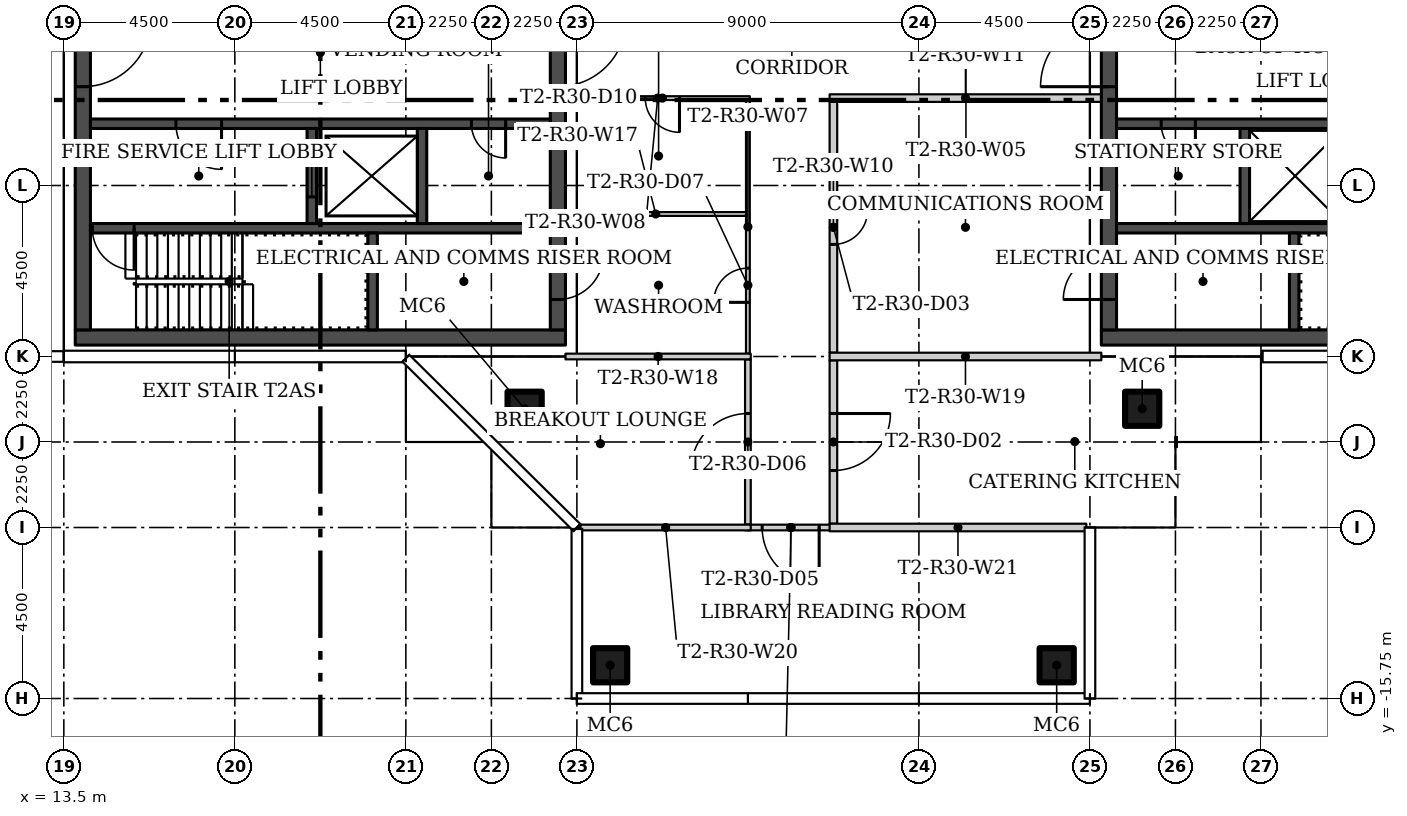
"""IFC4 building model, lengths in metres.
Left out: names, types, materials, properties, quantities, classifications, styles, units other than length and angle.
Written with IfcOpenShell. Run it as: python <this file> out.ifc"""

import sys

from ifc_helpers import new_model, si_unit, direction, frame, frame_2d, origin, origin_2d, place, context, subcontext, project, spatial, rectangle, hollow_rectangle, extrude, element, fill, save


model = new_model("IFC4")
c1 = context("Model", 3, precision=1e-05, world=origin(), true_north=direction((0.0, 1.0)))
c2 = subcontext(c1, "Body", "Model", "MODEL_VIEW")
j1 = project(units=[si_unit("LENGTHUNIT", "METRE"), si_unit("PLANEANGLEUNIT", "RADIAN")], contexts=[c1])
p1 = place(None, origin())
s1 = spatial("IfcSite", under=j1, at=p1, CompositionType="ELEMENT")
p2 = place(p1, origin())
s2 = spatial("IfcBuilding", under=s1, at=p2, CompositionType="ELEMENT")
p3 = place(p2, frame((0.0, 0.0, 269.4)))
s3 = spatial("IfcBuildingStorey", under=s2, at=p3, CompositionType="ELEMENT", Elevation=269.4)
for number, where in (
    (1, (25.625, -8.125, 0.0)),
    (2, (41.875, -8.125, 0.0)),
    (3, (39.625, -14.875, 0.0)),
    (4, (27.875, -14.875, 0.0)),
):
    element("IfcColumn", number, at=place(p3, frame(where)), inside=s3, PredefinedType="COLUMN", context=c2, shape_type="SweptSolid", body=[
        extrude(hollow_rectangle(XDim=0.9, YDim=0.9, WallThickness=0.036, at=origin_2d()), origin(), (0.0, 0.0, 1.0), 3.45),
    ])
p4 = place(p3, frame((31.5, -11.175, 0.0), z_axis=(0.0, 0.0, 1.0), x_axis=(0.0, 1.0, 0.0)))
e5 = element("IfcWall", 5, at=p4, inside=s3, PredefinedType="PARTITIONING", context=c2, shape_type="SweptSolid", body=[
    extrude(rectangle(XDim=4.35, YDim=0.15, at=frame_2d((2.175, 0.0))), origin(), (0.0, 0.0, 1.0), 3.45),
])
p5 = place(p4, frame((1.425, 0.0, 0.0)))
e6 = element("IfcOpeningElement", 6, at=p5, cuts=e5, PredefinedType="OPENING", context=c2, shape_type="SweptSolid", body=[
    extrude(rectangle(XDim=1.5, YDim=2.1, at=frame_2d((0.75, 1.05))), frame((0.0, 0.085, 0.0), z_axis=(0.0, -1.0, 0.0), x_axis=(1.0, 0.0, 0.0)), (0.0, 0.0, 1.0), 0.17),
])
p6 = place(p3, frame((31.5, -6.675, 0.0), z_axis=(0.0, 0.0, 1.0), x_axis=(0.0, 1.0, 0.0)))
e7 = element("IfcWall", 7, at=p6, inside=s3, PredefinedType="PARTITIONING", context=c2, shape_type="SweptSolid", body=[
    extrude(rectangle(XDim=6.675, YDim=0.1, at=frame_2d((3.337, 0.0))), origin(), (0.0, 0.0, 1.0), 3.45),
])
p7 = place(p6, frame((1.35, 0.0, 0.0)))
e8 = element("IfcOpeningElement", 8, at=p7, cuts=e7, PredefinedType="OPENING", context=c2, shape_type="SweptSolid", body=[
    extrude(rectangle(XDim=0.9, YDim=2.1, at=frame_2d((0.45, 1.05))), frame((0.0, 0.06, 0.0), z_axis=(0.0, -1.0, 0.0), x_axis=(1.0, 0.0, 0.0)), (0.0, 0.0, 1.0), 0.12),
])
p8 = place(p3, frame((31.55, 0.05, 0.0), z_axis=(0.0, 0.0, 1.0), x_axis=(-1.0, 0.0, 0.0)))
e9 = element("IfcWall", 9, at=p8, inside=s3, PredefinedType="PARTITIONING", context=c2, shape_type="SweptSolid", body=[
    extrude(rectangle(XDim=4.85, YDim=0.1, at=frame_2d((2.425, 0.0))), origin(), (0.0, 0.0, 1.0), 3.45),
])
p9 = place(p8, frame((1.85, 0.0, 0.0)))
e10 = element("IfcOpeningElement", 10, at=p9, cuts=e9, PredefinedType="OPENING", context=c2, shape_type="SweptSolid", body=[
    extrude(rectangle(XDim=0.9, YDim=2.1, at=frame_2d((0.45, 1.05))), frame((0.0, 0.06, 0.0), z_axis=(0.0, -1.0, 0.0), x_axis=(1.0, 0.0, 0.0)), (0.0, 0.0, 1.0), 0.12),
])
p10 = place(p3, frame((33.75, -0.05, 0.0), z_axis=(0.0, 0.0, 1.0), x_axis=(0.0, -1.0, 0.0)))
e11 = element("IfcWall", 11, at=p10, inside=s3, PredefinedType="PARTITIONING", context=c2, shape_type="SweptSolid", body=[
    extrude(rectangle(XDim=6.6, YDim=0.2, at=frame_2d((3.3, 0.0))), origin(), (0.0, 0.0, 1.0), 3.45),
])
p11 = place(p10, frame((2.85, 0.0, 0.0)))
e12 = element("IfcOpeningElement", 12, at=p11, cuts=e11, PredefinedType="OPENING", context=c2, shape_type="SweptSolid", body=[
    extrude(rectangle(XDim=0.9, YDim=2.1, at=frame_2d((0.45, 1.05))), frame((0.0, 0.11, 0.0), z_axis=(0.0, -1.0, 0.0), x_axis=(1.0, 0.0, 0.0)), (0.0, 0.0, 1.0), 0.22),
])
p12 = place(p3, frame((40.8, 0.05, 0.0), z_axis=(0.0, 0.0, 1.0), x_axis=(-1.0, 0.0, 0.0)))
e13 = element("IfcWall", 13, at=p12, inside=s3, PredefinedType="PARTITIONING", context=c2, shape_type="SweptSolid", body=[
    extrude(rectangle(XDim=7.15, YDim=0.2, at=frame_2d((3.575, 0.0))), origin(), (0.0, 0.0, 1.0), 3.45),
])
p13 = place(p3, frame((33.75, -6.85, 0.0), z_axis=(0.0, 0.0, 1.0), x_axis=(0.0, -1.0, 0.0)))
e14 = element("IfcWall", 14, at=p13, inside=s3, PredefinedType="PARTITIONING", context=c2, shape_type="SweptSolid", body=[
    extrude(rectangle(XDim=4.3, YDim=0.2, at=frame_2d((2.15, 0.0))), origin(), (0.0, 0.0, 1.0), 3.45),
])
p14 = place(p13, frame((1.4, 0.0, 0.0)))
e15 = element("IfcOpeningElement", 15, at=p14, cuts=e14, PredefinedType="OPENING", context=c2, shape_type="SweptSolid", body=[
    extrude(rectangle(XDim=1.5, YDim=2.4, at=frame_2d((0.75, 1.2))), frame((0.0, 0.11, 0.0), z_axis=(0.0, -1.0, 0.0), x_axis=(1.0, 0.0, 0.0)), (0.0, 0.0, 1.0), 0.22),
])
p15 = place(p3, frame((33.85, -11.25, 0.0), z_axis=(0.0, 0.0, 1.0), x_axis=(-1.0, 0.0, 0.0)))
e16 = element("IfcWall", 16, at=p15, inside=s3, PredefinedType="PARTITIONING", context=c2, shape_type="SweptSolid", body=[
    extrude(rectangle(XDim=2.425, YDim=0.15, at=frame_2d((1.212, 0.0))), origin(), (0.0, 0.0, 1.0), 3.45),
])
p16 = place(p15, frame((0.475, 0.0, 0.0)))
e17 = element("IfcOpeningElement", 17, at=p16, cuts=e16, PredefinedType="OPENING", context=c2, shape_type="SweptSolid", body=[
    extrude(rectangle(XDim=1.5, YDim=2.1, at=frame_2d((0.75, 1.05))), frame((0.0, 0.085, 0.0), z_axis=(0.0, -1.0, 0.0), x_axis=(1.0, 0.0, 0.0)), (0.0, 0.0, 1.0), 0.17),
])
p17 = place(p3, frame((31.45, -3.0, 0.0), z_axis=(0.0, 0.0, 1.0), x_axis=(-1.0, 0.0, 0.0)))
e18 = element("IfcWall", 18, at=p17, inside=s3, PredefinedType="PARTITIONING", context=c2, shape_type="SweptSolid", body=[
    extrude(rectangle(XDim=4.75, YDim=0.1, at=frame_2d((2.375, 0.0))), origin(), (0.0, 0.0, 1.0), 3.45),
])
p18 = place(p3, frame((26.7, -6.75, 0.0)))
e19 = element("IfcWall", 19, at=p18, inside=s3, PredefinedType="PARTITIONING", context=c2, shape_type="SweptSolid", body=[
    extrude(rectangle(XDim=4.875, YDim=0.15, at=frame_2d((2.438, 0.0))), origin(), (0.0, 0.0, 1.0), 3.45),
])
p19 = place(p3, frame((33.65, -6.75, 0.0)))
e20 = element("IfcWall", 20, at=p19, inside=s3, PredefinedType="PARTITIONING", context=c2, shape_type="SweptSolid", body=[
    extrude(rectangle(XDim=7.15, YDim=0.2, at=frame_2d((3.575, 0.0))), origin(), (0.0, 0.0, 1.0), 3.45),
])
p20 = place(p3, frame((27.095, -11.25, 0.0)))
e21 = element("IfcWall", 21, at=p20, inside=s3, PredefinedType="PARTITIONING", context=c2, shape_type="SweptSolid", body=[
    extrude(rectangle(XDim=4.48, YDim=0.15, at=frame_2d((2.24, 0.0))), origin(), (0.0, 0.0, 1.0), 3.45),
])
p21 = place(p3, frame((33.65, -11.25, 0.0)))
e22 = element("IfcWall", 22, at=p21, inside=s3, PredefinedType="PARTITIONING", context=c2, shape_type="SweptSolid", body=[
    extrude(rectangle(XDim=6.755, YDim=0.2, at=frame_2d((3.377, 0.0))), origin(), (0.0, 0.0, 1.0), 3.45),
])
p22 = place(p3, frame((13.8, -6.25, 0.0)))
e23 = element("IfcWall", 23, at=p22, inside=s3, PredefinedType="SHEAR", context=c2, shape_type="SweptSolid", body=[
    extrude(rectangle(XDim=12.9, YDim=0.4, at=frame_2d((6.45, 0.0))), origin(), (0.0, 0.0, 1.0), 3.45),
])
p23 = place(p3, frame((14.0, 6.05, 0.0), z_axis=(0.0, 0.0, 1.0), x_axis=(0.0, -1.0, 0.0)))
e24 = element("IfcWall", 24, at=p23, inside=s3, PredefinedType="SHEAR", context=c2, shape_type="SweptSolid", body=[
    extrude(rectangle(XDim=12.1, YDim=0.4, at=frame_2d((6.05, 0.0))), origin(), (0.0, 0.0, 1.0), 3.45),
])
p24 = place(p23, frame((3.9, 0.0, 0.0)))
e25 = element("IfcOpeningElement", 25, at=p24, cuts=e24, PredefinedType="OPENING", context=c2, shape_type="SweptSolid", body=[
    extrude(rectangle(XDim=1.8, YDim=2.4, at=frame_2d((0.9, 1.2))), frame((0.0, 0.21, 0.0), z_axis=(0.0, -1.0, 0.0), x_axis=(1.0, 0.0, 0.0)), (0.0, 0.0, 1.0), 0.42),
])
p25 = place(p3, frame((26.5, 6.05, 0.0), z_axis=(0.0, 0.0, 1.0), x_axis=(0.0, -1.0, 0.0)))
e26 = element("IfcWall", 26, at=p25, inside=s3, PredefinedType="SHEAR", context=c2, shape_type="SweptSolid", body=[
    extrude(rectangle(XDim=12.1, YDim=0.4, at=frame_2d((6.05, 0.0))), origin(), (0.0, 0.0, 1.0), 3.45),
])
p26 = place(p25, frame((10.1, 0.0, 0.0)))
e27 = element("IfcOpeningElement", 27, at=p26, cuts=e26, PredefinedType="OPENING", context=c2, shape_type="SweptSolid", body=[
    extrude(rectangle(XDim=1.2, YDim=2.1, at=frame_2d((0.6, 1.05))), frame((0.0, 0.21, 0.0), z_axis=(0.0, -1.0, 0.0), x_axis=(1.0, 0.0, 0.0)), (0.0, 0.0, 1.0), 0.42),
])
p27 = place(p25, frame((3.9, 0.0, 0.0)))
e28 = element("IfcOpeningElement", 28, at=p27, cuts=e26, PredefinedType="OPENING", context=c2, shape_type="SweptSolid", body=[
    extrude(rectangle(XDim=1.8, YDim=2.4, at=frame_2d((0.9, 1.2))), frame((0.0, 0.21, 0.0), z_axis=(0.0, -1.0, 0.0), x_axis=(1.0, 0.0, 0.0)), (0.0, 0.0, 1.0), 0.42),
])
p28 = place(p3, frame((26.3, -3.375, 0.0), z_axis=(0.0, 0.0, 1.0), x_axis=(-1.0, 0.0, 0.0)))
e29 = element("IfcWall", 29, at=p28, inside=s3, PredefinedType="SHEAR", context=c2, shape_type="SweptSolid", body=[
    extrude(rectangle(XDim=12.1, YDim=0.25, at=frame_2d((6.05, 0.0))), origin(), (0.0, 0.0, 1.0), 3.45),
])
p29 = place(p28, frame((10.95, 0.0, 0.0)))
e30 = element("IfcOpeningElement", 30, at=p29, cuts=e29, PredefinedType="OPENING", context=c2, shape_type="SweptSolid", body=[
    extrude(rectangle(XDim=1.1, YDim=2.1, at=frame_2d((0.55, 1.05))), frame((0.0, 0.135, 0.0), z_axis=(0.0, -1.0, 0.0), x_axis=(1.0, 0.0, 0.0)), (0.0, 0.0, 1.0), 0.27),
])
p30 = place(p3, frame((21.625, -6.05, 0.0), z_axis=(0.0, 0.0, 1.0), x_axis=(0.0, 1.0, 0.0)))
e31 = element("IfcWall", 31, at=p30, inside=s3, PredefinedType="SHEAR", context=c2, shape_type="SweptSolid", body=[
    extrude(rectangle(XDim=2.55, YDim=0.25, at=frame_2d((1.275, 0.0))), origin(), (0.0, 0.0, 1.0), 3.45),
])
p31 = place(p3, frame((26.3, -0.625, 0.0), z_axis=(0.0, 0.0, 1.0), x_axis=(-1.0, 0.0, 0.0)))
e32 = element("IfcWall", 32, at=p31, inside=s3, PredefinedType="SHEAR", context=c2, shape_type="SweptSolid", body=[
    extrude(rectangle(XDim=12.1, YDim=0.25, at=frame_2d((6.05, 0.0))), origin(), (0.0, 0.0, 1.0), 3.45),
])
p32 = place(p31, frame((8.65, 0.0, 0.0)))
e33 = element("IfcOpeningElement", 33, at=p32, cuts=e32, PredefinedType="OPENING", context=c2, shape_type="SweptSolid", body=[
    extrude(rectangle(XDim=1.2, YDim=2.1, at=frame_2d((0.6, 1.05))), frame((0.0, 0.135, 0.0), z_axis=(0.0, -1.0, 0.0), x_axis=(1.0, 0.0, 0.0)), (0.0, 0.0, 1.0), 0.27),
])
p33 = place(p31, frame((1.175, 0.0, 0.0)))
e34 = element("IfcOpeningElement", 34, at=p33, cuts=e32, PredefinedType="OPENING", context=c2, shape_type="SweptSolid", body=[
    extrude(rectangle(XDim=0.9, YDim=2.1, at=frame_2d((0.45, 1.05))), frame((0.0, 0.135, 0.0), z_axis=(0.0, -1.0, 0.0), x_axis=(1.0, 0.0, 0.0)), (0.0, 0.0, 1.0), 0.27),
])
p34 = place(p3, frame((20.025, -3.25, 0.0), z_axis=(0.0, 0.0, 1.0), x_axis=(0.0, 1.0, 0.0)))
e35 = element("IfcWall", 35, at=p34, inside=s3, PredefinedType="SHEAR", context=c2, shape_type="SweptSolid", body=[
    extrude(rectangle(XDim=2.5, YDim=0.25, at=frame_2d((1.25, 0.0))), origin(), (0.0, 0.0, 1.0), 3.45),
])
p35 = place(p34, frame((0.7, 0.0, 0.0)))
e36 = element("IfcOpeningElement", 36, at=p35, cuts=e35, PredefinedType="OPENING", context=c2, shape_type="SweptSolid", body=[
    extrude(rectangle(XDim=1.1, YDim=2.1, at=frame_2d((0.55, 1.05))), frame((0.0, 0.135, 0.0), z_axis=(0.0, -1.0, 0.0), x_axis=(1.0, 0.0, 0.0)), (0.0, 0.0, 1.0), 0.27),
])
p36 = place(p3, frame((22.925, -3.25, 0.0), z_axis=(0.0, 0.0, 1.0), x_axis=(0.0, 1.0, 0.0)))
e37 = element("IfcWall", 37, at=p36, inside=s3, PredefinedType="SHEAR", context=c2, shape_type="SweptSolid", body=[
    extrude(rectangle(XDim=2.5, YDim=0.25, at=frame_2d((1.25, 0.0))), origin(), (0.0, 0.0, 1.0), 3.45),
])
p37 = place(p3, frame((53.7, -6.25, 0.0), z_axis=(0.0, 0.0, 1.0), x_axis=(-1.0, 0.0, 0.0)))
e38 = element("IfcWall", 38, at=p37, inside=s3, PredefinedType="SHEAR", context=c2, shape_type="SweptSolid", body=[
    extrude(rectangle(XDim=12.9, YDim=0.4, at=frame_2d((6.45, 0.0))), origin(), (0.0, 0.0, 1.0), 3.45),
])
p38 = place(p3, frame((41.0, -6.05, 0.0), z_axis=(0.0, 0.0, 1.0), x_axis=(0.0, 1.0, 0.0)))
e39 = element("IfcWall", 39, at=p38, inside=s3, PredefinedType="SHEAR", context=c2, shape_type="SweptSolid", body=[
    extrude(rectangle(XDim=12.1, YDim=0.4, at=frame_2d((6.05, 0.0))), origin(), (0.0, 0.0, 1.0), 3.45),
])
p39 = place(p38, frame((0.8, 0.0, 0.0)))
e40 = element("IfcOpeningElement", 40, at=p39, cuts=e39, PredefinedType="OPENING", context=c2, shape_type="SweptSolid", body=[
    extrude(rectangle(XDim=1.2, YDim=2.1, at=frame_2d((0.6, 1.05))), frame((0.0, 0.21, 0.0), z_axis=(0.0, -1.0, 0.0), x_axis=(1.0, 0.0, 0.0)), (0.0, 0.0, 1.0), 0.42),
])
p40 = place(p38, frame((6.4, 0.0, 0.0)))
e41 = element("IfcOpeningElement", 41, at=p40, cuts=e39, PredefinedType="OPENING", context=c2, shape_type="SweptSolid", body=[
    extrude(rectangle(XDim=1.8, YDim=2.4, at=frame_2d((0.9, 1.2))), frame((0.0, 0.21, 0.0), z_axis=(0.0, -1.0, 0.0), x_axis=(1.0, 0.0, 0.0)), (0.0, 0.0, 1.0), 0.42),
])
p41 = place(p3, frame((53.3, -3.375, 0.0), z_axis=(0.0, 0.0, 1.0), x_axis=(-1.0, 0.0, 0.0)))
e42 = element("IfcWall", 42, at=p41, inside=s3, PredefinedType="SHEAR", context=c2, shape_type="SweptSolid", body=[
    extrude(rectangle(XDim=12.1, YDim=0.25, at=frame_2d((6.05, 0.0))), origin(), (0.0, 0.0, 1.0), 3.45),
])
p42 = place(p41, frame((0.05, 0.0, 0.0)))
e43 = element("IfcOpeningElement", 43, at=p42, cuts=e42, PredefinedType="OPENING", context=c2, shape_type="SweptSolid", body=[
    extrude(rectangle(XDim=1.1, YDim=2.1, at=frame_2d((0.55, 1.05))), frame((0.0, 0.135, 0.0), z_axis=(0.0, -1.0, 0.0), x_axis=(1.0, 0.0, 0.0)), (0.0, 0.0, 1.0), 0.27),
])
p43 = place(p3, frame((45.875, -6.05, 0.0), z_axis=(0.0, 0.0, 1.0), x_axis=(0.0, 1.0, 0.0)))
e44 = element("IfcWall", 44, at=p43, inside=s3, PredefinedType="SHEAR", context=c2, shape_type="SweptSolid", body=[
    extrude(rectangle(XDim=2.55, YDim=0.25, at=frame_2d((1.275, 0.0))), origin(), (0.0, 0.0, 1.0), 3.45),
])
p44 = place(p3, frame((53.3, -0.625, 0.0), z_axis=(0.0, 0.0, 1.0), x_axis=(-1.0, 0.0, 0.0)))
e45 = element("IfcWall", 45, at=p44, inside=s3, PredefinedType="SHEAR", context=c2, shape_type="SweptSolid", body=[
    extrude(rectangle(XDim=12.1, YDim=0.25, at=frame_2d((6.05, 0.0))), origin(), (0.0, 0.0, 1.0), 3.45),
])
p45 = place(p44, frame((2.25, 0.0, 0.0)))
e46 = element("IfcOpeningElement", 46, at=p45, cuts=e45, PredefinedType="OPENING", context=c2, shape_type="SweptSolid", body=[
    extrude(rectangle(XDim=1.2, YDim=2.1, at=frame_2d((0.6, 1.05))), frame((0.0, 0.135, 0.0), z_axis=(0.0, -1.0, 0.0), x_axis=(1.0, 0.0, 0.0)), (0.0, 0.0, 1.0), 0.27),
])
p46 = place(p44, frame((10.025, 0.0, 0.0)))
e47 = element("IfcOpeningElement", 47, at=p46, cuts=e45, PredefinedType="OPENING", context=c2, shape_type="SweptSolid", body=[
    extrude(rectangle(XDim=0.9, YDim=2.1, at=frame_2d((0.45, 1.05))), frame((0.0, 0.135, 0.0), z_axis=(0.0, -1.0, 0.0), x_axis=(1.0, 0.0, 0.0)), (0.0, 0.0, 1.0), 0.27),
])
p47 = place(p3, frame((44.575, -3.25, 0.0), z_axis=(0.0, 0.0, 1.0), x_axis=(0.0, 1.0, 0.0)))
e48 = element("IfcWall", 48, at=p47, inside=s3, PredefinedType="SHEAR", context=c2, shape_type="SweptSolid", body=[
    extrude(rectangle(XDim=2.5, YDim=0.25, at=frame_2d((1.25, 0.0))), origin(), (0.0, 0.0, 1.0), 3.45),
])
p48 = place(p14, origin())
e49 = element("IfcDoor", 49, at=p48, inside=s3, OperationType="DOUBLE_DOOR_SINGLE_SWING", PredefinedType="DOOR", context=c2, shape_type="SweptSolid", body=[
    extrude(rectangle(XDim=1.5, YDim=2.4, at=frame_2d((0.75, 1.2))), frame((0.0, 0.025, 0.0), z_axis=(0.0, -1.0, 0.0), x_axis=(1.0, 0.0, 0.0)), (0.0, 0.0, 1.0), 0.05),
])
fill(e15, e49)
p49 = place(p11, origin())
e50 = element("IfcDoor", 50, at=p49, inside=s3, OperationType="SINGLE_SWING_LEFT", PredefinedType="DOOR", context=c2, shape_type="SweptSolid", body=[
    extrude(rectangle(XDim=0.9, YDim=2.1, at=frame_2d((0.45, 1.05))), frame((0.0, 0.025, 0.0), z_axis=(0.0, -1.0, 0.0), x_axis=(1.0, 0.0, 0.0)), (0.0, 0.0, 1.0), 0.05),
])
fill(e12, e50)
p50 = place(p16, origin())
e51 = element("IfcDoor", 51, at=p50, inside=s3, OperationType="DOUBLE_DOOR_SINGLE_SWING", PredefinedType="DOOR", context=c2, shape_type="SweptSolid", body=[
    extrude(rectangle(XDim=1.5, YDim=2.1, at=frame_2d((0.75, 1.05))), frame((0.0, 0.025, 0.0), z_axis=(0.0, -1.0, 0.0), x_axis=(1.0, 0.0, 0.0)), (0.0, 0.0, 1.0), 0.05),
])
fill(e17, e51)
p51 = place(p5, origin())
e52 = element("IfcDoor", 52, at=p51, inside=s3, OperationType="DOUBLE_DOOR_SINGLE_SWING", PredefinedType="DOOR", context=c2, shape_type="SweptSolid", body=[
    extrude(rectangle(XDim=1.5, YDim=2.1, at=frame_2d((0.75, 1.05))), frame((0.0, 0.025, 0.0), z_axis=(0.0, -1.0, 0.0), x_axis=(1.0, 0.0, 0.0)), (0.0, 0.0, 1.0), 0.05),
])
fill(e6, e52)
p52 = place(p7, origin())
e53 = element("IfcDoor", 53, at=p52, inside=s3, OperationType="SINGLE_SWING_LEFT", PredefinedType="DOOR", context=c2, shape_type="SweptSolid", body=[
    extrude(rectangle(XDim=0.9, YDim=2.1, at=frame_2d((0.45, 1.05))), frame((0.0, 0.025, 0.0), z_axis=(0.0, -1.0, 0.0), x_axis=(1.0, 0.0, 0.0)), (0.0, 0.0, 1.0), 0.05),
])
fill(e8, e53)
p53 = place(p9, origin())
e54 = element("IfcDoor", 54, at=p53, inside=s3, OperationType="SINGLE_SWING_RIGHT", PredefinedType="DOOR", context=c2, shape_type="SweptSolid", body=[
    extrude(rectangle(XDim=0.9, YDim=2.1, at=frame_2d((0.45, 1.05))), frame((0.0, 0.025, 0.0), z_axis=(0.0, -1.0, 0.0), x_axis=(1.0, 0.0, 0.0)), (0.0, 0.0, 1.0), 0.05),
])
fill(e10, e54)
p54 = place(p24, origin())
e55 = element("IfcDoor", 55, at=p54, inside=s3, OperationType="DOUBLE_DOOR_SINGLE_SWING", PredefinedType="DOOR", context=c2, shape_type="SweptSolid", body=[
    extrude(rectangle(XDim=1.8, YDim=2.4, at=frame_2d((0.9, 1.2))), frame((0.0, 0.025, 0.0), z_axis=(0.0, -1.0, 0.0), x_axis=(1.0, 0.0, 0.0)), (0.0, 0.0, 1.0), 0.05),
])
fill(e25, e55)
p55 = place(p26, origin())
e56 = element("IfcDoor", 56, at=p55, inside=s3, OperationType="SINGLE_SWING_RIGHT", PredefinedType="DOOR", context=c2, shape_type="SweptSolid", body=[
    extrude(rectangle(XDim=1.2, YDim=2.1, at=frame_2d((0.6, 1.05))), frame((0.0, 0.025, 0.0), z_axis=(0.0, -1.0, 0.0), x_axis=(1.0, 0.0, 0.0)), (0.0, 0.0, 1.0), 0.05),
])
fill(e27, e56)
p56 = place(p27, origin())
e57 = element("IfcDoor", 57, at=p56, inside=s3, OperationType="DOUBLE_DOOR_SINGLE_SWING", PredefinedType="DOOR", context=c2, shape_type="SweptSolid", body=[
    extrude(rectangle(XDim=1.8, YDim=2.4, at=frame_2d((0.9, 1.2))), frame((0.0, 0.025, 0.0), z_axis=(0.0, -1.0, 0.0), x_axis=(1.0, 0.0, 0.0)), (0.0, 0.0, 1.0), 0.05),
])
fill(e28, e57)
p57 = place(p29, origin())
e58 = element("IfcDoor", 58, at=p57, inside=s3, OperationType="SINGLE_SWING_RIGHT", PredefinedType="DOOR", context=c2, shape_type="SweptSolid", body=[
    extrude(rectangle(XDim=1.1, YDim=2.1, at=frame_2d((0.55, 1.05))), frame((0.0, 0.025, 0.0), z_axis=(0.0, -1.0, 0.0), x_axis=(1.0, 0.0, 0.0)), (0.0, 0.0, 1.0), 0.05),
])
fill(e30, e58)
p58 = place(p32, origin())
e59 = element("IfcDoor", 59, at=p58, inside=s3, OperationType="SINGLE_SWING_RIGHT", PredefinedType="DOOR", context=c2, shape_type="SweptSolid", body=[
    extrude(rectangle(XDim=1.2, YDim=2.1, at=frame_2d((0.6, 1.05))), frame((0.0, 0.025, 0.0), z_axis=(0.0, -1.0, 0.0), x_axis=(1.0, 0.0, 0.0)), (0.0, 0.0, 1.0), 0.05),
])
fill(e33, e59)
p59 = place(p33, origin())
e60 = element("IfcDoor", 60, at=p59, inside=s3, OperationType="SINGLE_SWING_LEFT", PredefinedType="DOOR", context=c2, shape_type="SweptSolid", body=[
    extrude(rectangle(XDim=0.9, YDim=2.1, at=frame_2d((0.45, 1.05))), frame((0.0, 0.025, 0.0), z_axis=(0.0, -1.0, 0.0), x_axis=(1.0, 0.0, 0.0)), (0.0, 0.0, 1.0), 0.05),
])
fill(e34, e60)
p60 = place(p35, origin())
e61 = element("IfcDoor", 61, at=p60, inside=s3, OperationType="SLIDING_TO_LEFT", PredefinedType="DOOR", context=c2, shape_type="SweptSolid", body=[
    extrude(rectangle(XDim=1.1, YDim=2.1, at=frame_2d((0.55, 1.05))), frame((0.0, 0.025, 0.0), z_axis=(0.0, -1.0, 0.0), x_axis=(1.0, 0.0, 0.0)), (0.0, 0.0, 1.0), 0.05),
])
fill(e36, e61)
p61 = place(p39, origin())
e62 = element("IfcDoor", 62, at=p61, inside=s3, OperationType="SINGLE_SWING_LEFT", PredefinedType="DOOR", context=c2, shape_type="SweptSolid", body=[
    extrude(rectangle(XDim=1.2, YDim=2.1, at=frame_2d((0.6, 1.05))), frame((0.0, 0.025, 0.0), z_axis=(0.0, -1.0, 0.0), x_axis=(1.0, 0.0, 0.0)), (0.0, 0.0, 1.0), 0.05),
])
fill(e40, e62)
p62 = place(p40, origin())
e63 = element("IfcDoor", 63, at=p62, inside=s3, OperationType="DOUBLE_DOOR_SINGLE_SWING", PredefinedType="DOOR", context=c2, shape_type="SweptSolid", body=[
    extrude(rectangle(XDim=1.8, YDim=2.4, at=frame_2d((0.9, 1.2))), frame((0.0, 0.025, 0.0), z_axis=(0.0, -1.0, 0.0), x_axis=(1.0, 0.0, 0.0)), (0.0, 0.0, 1.0), 0.05),
])
fill(e41, e63)
p63 = place(p46, origin())
e64 = element("IfcDoor", 64, at=p63, inside=s3, OperationType="SINGLE_SWING_RIGHT", PredefinedType="DOOR", context=c2, shape_type="SweptSolid", body=[
    extrude(rectangle(XDim=0.9, YDim=2.1, at=frame_2d((0.45, 1.05))), frame((0.0, 0.025, 0.0), z_axis=(0.0, -1.0, 0.0), x_axis=(1.0, 0.0, 0.0)), (0.0, 0.0, 1.0), 0.05),
])
fill(e47, e64)
save(model, sys.argv[1])
